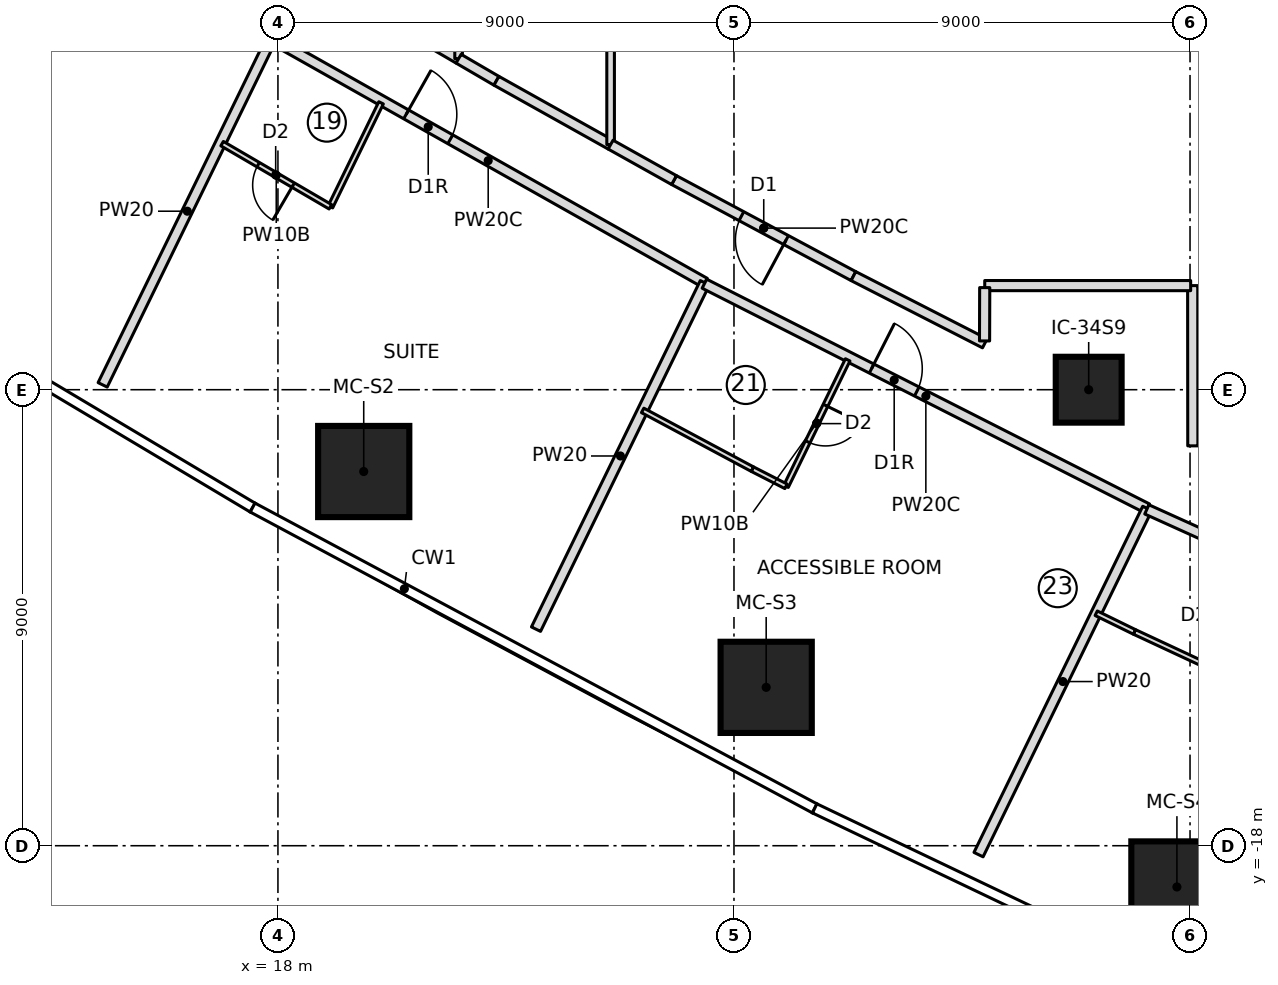
"""IFC4 building model, lengths in metres.
Left out: names, types, materials, properties, quantities, classifications, styles, units other than length and angle.
Written with IfcOpenShell. Run it as: python <this file> out.ifc"""

import sys

from ifc_helpers import new_model, si_unit, direction, frame, frame_2d, origin, origin_2d, place, context, subcontext, project, spatial, rectangle, extrude, element, fill, save


model = new_model("IFC4")
c1 = context("Model", 3, precision=1e-05, world=origin(), true_north=direction((0.0, 1.0)))
c2 = subcontext(c1, "Body", "Model", "MODEL_VIEW")
j1 = project(units=[si_unit("LENGTHUNIT", "METRE"), si_unit("PLANEANGLEUNIT", "RADIAN")], contexts=[c1])
p1 = place(None, origin())
s1 = spatial("IfcSite", under=j1, at=p1, CompositionType="ELEMENT")
p2 = place(p1, origin())
s2 = spatial("IfcBuilding", under=s1, at=p2, CompositionType="ELEMENT")
p3 = place(p2, frame((0.0, 0.0, 57.35)))
s3 = spatial("IfcBuildingStorey", under=s2, at=p3, CompositionType="ELEMENT", Elevation=57.35)
for number, where, z_axis, x_axis in (
    (1, (19.693, -10.615, 0.0), (0.0, 0.0, 1.0), (1.0, 0.0, 0.0)),
    (2, (27.635, -14.874, 0.0), (0.0, 0.0, 1.0), (1.0, 0.0, 0.0)),
    (3, (35.741, -18.814, 0.0), (0.0, 0.0, 1.0), (1.0, 0.0, 0.0)),
):
    element("IfcColumn", number, at=place(p3, frame(where, z_axis=z_axis, x_axis=x_axis)), inside=s3, PredefinedType="COLUMN", context=c2, shape_type="SweptSolid", body=[
        extrude(rectangle(XDim=1.8, YDim=1.8, at=origin_2d()), origin(), (0.0, 0.0, 1.0), 3.55),
    ])
p4 = place(p3, frame((34.0, -9.0, 0.0), z_axis=(0.0, 0.0, 1.0), x_axis=(1.0, 0.0, 0.0)))
e4 = element("IfcColumn", 4, at=p4, inside=s3, PredefinedType="COLUMN", context=c2, shape_type="SweptSolid", body=[
    extrude(rectangle(XDim=1.3, YDim=1.3, at=origin_2d()), origin(), (0.0, 0.0, 1.0), 3.55),
])
p5 = place(p3, frame((14.541, -8.904, 0.0), z_axis=(0.0, 0.0, 1.0), x_axis=(0.438213564788, 0.898870887078, 0.0)))
e5 = element("IfcWall", 5, at=p5, inside=s3, PredefinedType="PARTITIONING", context=c2, shape_type="SweptSolid", body=[
    extrude(rectangle(XDim=7.625, YDim=0.2, at=frame_2d((3.813, 0.0))), origin(), (0.0, 0.0, 1.0), 3.25),
])
p6 = place(p3, frame((17.874, -2.068, 0.0), z_axis=(0.0, 0.0, 1.0), x_axis=(0.871078318876, -0.491144136057, 0.0)))
e6 = element("IfcWall", 6, at=p6, inside=s3, PredefinedType="PARTITIONING", context=c2, shape_type="SweptSolid", body=[
    extrude(rectangle(XDim=9.817, YDim=0.2, at=frame_2d((4.909, 0.0))), origin(), (0.0, 0.0, 1.0), 3.25),
])
p7 = place(p6, frame((3.05, 0.0, 0.0)))
e7 = element("IfcOpeningElement", 7, at=p7, cuts=e6, PredefinedType="OPENING", context=c2, shape_type="SweptSolid", body=[
    extrude(rectangle(XDim=1.0, YDim=2.1, at=frame_2d((0.5, 1.05))), frame((0.0, 0.11, 0.0), z_axis=(0.0, -1.0, 0.0), x_axis=(1.0, 0.0, 0.0)), (0.0, 0.0, 1.0), 0.22),
])
p8 = place(p3, frame((20.035, -3.338, 0.0), z_axis=(0.0, 0.0, 1.0), x_axis=(-0.438122322582, -0.898915363344, 0.0)))
e8 = element("IfcWall", 8, at=p8, inside=s3, PredefinedType="PARTITIONING", context=c2, shape_type="SweptSolid", body=[
    extrude(rectangle(XDim=2.283, YDim=0.1, at=frame_2d((1.142, 0.0))), origin(), (0.0, 0.0, 1.0), 3.25),
])
p9 = place(p3, frame((19.035, -5.39, 0.0), z_axis=(0.0, 0.0, 1.0), x_axis=(-0.863707305865, 0.503993739837, 0.0)))
e9 = element("IfcWall", 9, at=p9, inside=s3, PredefinedType="PARTITIONING", context=c2, shape_type="SweptSolid", body=[
    extrude(rectangle(XDim=2.474, YDim=0.1, at=frame_2d((1.237, 0.0))), origin(), (0.0, 0.0, 1.0), 3.25),
])
p10 = place(p9, frame((0.85, 0.0, 0.0)))
e10 = element("IfcOpeningElement", 10, at=p10, cuts=e9, PredefinedType="OPENING", context=c2, shape_type="SweptSolid", body=[
    extrude(rectangle(XDim=0.8, YDim=2.1, at=frame_2d((0.4, 1.05))), frame((0.0, 0.06, 0.0), z_axis=(0.0, -1.0, 0.0), x_axis=(1.0, 0.0, 0.0)), (0.0, 0.0, 1.0), 0.12),
])
p11 = place(p3, frame((23.093, -13.726, 0.0), z_axis=(0.0, 0.0, 1.0), x_axis=(0.438202895602, 0.898876088394, 0.0)))
e11 = element("IfcWall", 11, at=p11, inside=s3, PredefinedType="PARTITIONING", context=c2, shape_type="SweptSolid", body=[
    extrude(rectangle(XDim=7.605, YDim=0.2, at=frame_2d((3.803, 0.0))), origin(), (0.0, 0.0, 1.0), 3.25),
])
p12 = place(p3, frame((26.417, -6.908, 0.0), z_axis=(0.0, 0.0, 1.0), x_axis=(0.891700643128, -0.452625632334, 0.0)))
e12 = element("IfcWall", 12, at=p12, inside=s3, PredefinedType="PARTITIONING", context=c2, shape_type="SweptSolid", body=[
    extrude(rectangle(XDim=9.801, YDim=0.2, at=frame_2d((4.901, 0.0))), origin(), (0.0, 0.0, 1.0), 3.25),
])
p13 = place(p12, frame((3.7, 0.0, 0.0)))
e13 = element("IfcOpeningElement", 13, at=p13, cuts=e12, PredefinedType="OPENING", context=c2, shape_type="SweptSolid", body=[
    extrude(rectangle(XDim=1.0, YDim=2.1, at=frame_2d((0.5, 1.05))), frame((0.0, 0.11, 0.0), z_axis=(0.0, -1.0, 0.0), x_axis=(1.0, 0.0, 0.0)), (0.0, 0.0, 1.0), 0.22),
])
p14 = place(p3, frame((29.244, -8.411, 0.0), z_axis=(0.0, 0.0, 1.0), x_axis=(-0.438189818179, -0.898882463531, 0.0)))
e14 = element("IfcWall", 14, at=p14, inside=s3, PredefinedType="PARTITIONING", context=c2, shape_type="SweptSolid", body=[
    extrude(rectangle(XDim=2.777, YDim=0.1, at=frame_2d((1.389, 0.0))), origin(), (0.0, 0.0, 1.0), 3.25),
])
p15 = place(p14, frame((1.0, 0.0, 0.0)))
e15 = element("IfcOpeningElement", 15, at=p15, cuts=e14, PredefinedType="OPENING", context=c2, shape_type="SweptSolid", body=[
    extrude(rectangle(XDim=0.8, YDim=2.1, at=frame_2d((0.4, 1.05))), frame((0.0, 0.06, 0.0), z_axis=(0.0, -1.0, 0.0), x_axis=(1.0, 0.0, 0.0)), (0.0, 0.0, 1.0), 0.12),
])
p16 = place(p3, frame((28.027, -10.907, 0.0), z_axis=(0.0, 0.0, 1.0), x_axis=(-0.890195653003, 0.455578422858, 0.0)))
e16 = element("IfcWall", 16, at=p16, inside=s3, PredefinedType="PARTITIONING", context=c2, shape_type="SweptSolid", body=[
    extrude(rectangle(XDim=0.745, YDim=0.1, at=frame_2d((0.373, 0.0))), origin(), (0.0, 0.0, 1.0), 3.25),
])
p17 = place(p3, frame((27.363, -10.568, 0.0), z_axis=(0.0, 0.0, 1.0), x_axis=(-0.881658684569, 0.471887660279, 0.0)))
e17 = element("IfcWall", 17, at=p17, inside=s3, PredefinedType="PARTITIONING", context=c2, shape_type="SweptSolid", body=[
    extrude(rectangle(XDim=2.457, YDim=0.1, at=frame_2d((1.228, 0.0))), origin(), (0.0, 0.0, 1.0), 3.25),
])
p18 = place(p3, frame((31.826, -18.176, 0.0), z_axis=(0.0, 0.0, 1.0), x_axis=(0.438196407286, 0.898879251425, 0.0)))
e18 = element("IfcWall", 18, at=p18, inside=s3, PredefinedType="PARTITIONING", context=c2, shape_type="SweptSolid", body=[
    extrude(rectangle(XDim=7.6, YDim=0.2, at=frame_2d((3.8, 0.0))), origin(), (0.0, 0.0, 1.0), 3.25),
])
p19 = place(p3, frame((35.148, -11.362, 0.0), z_axis=(0.0, 0.0, 1.0), x_axis=(0.9111333041, -0.412111759308, 0.0)))
e19 = element("IfcWall", 19, at=p19, inside=s3, PredefinedType="PARTITIONING", context=c2, shape_type="SweptSolid", body=[
    extrude(rectangle(XDim=9.804, YDim=0.2, at=frame_2d((4.902, 0.0))), origin(), (0.0, 0.0, 1.0), 3.25),
])
p20 = place(p19, frame((3.05, 0.0, 0.0)))
e20 = element("IfcOpeningElement", 20, at=p20, cuts=e19, PredefinedType="OPENING", context=c2, shape_type="SweptSolid", body=[
    extrude(rectangle(XDim=1.5, YDim=2.1, at=frame_2d((0.75, 1.05))), frame((0.0, 0.11, 0.0), z_axis=(0.0, -1.0, 0.0), x_axis=(1.0, 0.0, 0.0)), (0.0, 0.0, 1.0), 0.22),
])
p21 = place(p3, frame((36.408, -14.482, 0.0), z_axis=(0.0, 0.0, 1.0), x_axis=(-0.906434605418, 0.422346192242, 0.0)))
e21 = element("IfcWall", 21, at=p21, inside=s3, PredefinedType="PARTITIONING", context=c2, shape_type="SweptSolid", body=[
    extrude(rectangle(XDim=1.661, YDim=0.1, at=frame_2d((0.83, 0.0))), origin(), (0.0, 0.0, 1.0), 3.25),
])
p22 = place(p3, frame((34.903, -13.781, 0.0), z_axis=(0.0, 0.0, 1.0), x_axis=(-0.89828999443, 0.43940310184, 0.0)))
e22 = element("IfcWall", 22, at=p22, inside=s3, PredefinedType="PARTITIONING", context=c2, shape_type="SweptSolid", body=[
    extrude(rectangle(XDim=0.84, YDim=0.1, at=frame_2d((0.42, 0.0))), origin(), (0.0, 0.0, 1.0), 3.25),
])
p23 = place(p3, frame((21.565, -2.467, 0.0), z_axis=(0.0, 0.0, 1.0), x_axis=(-0.86371145221, 0.503986634071, 0.0)))
e23 = element("IfcWall", 23, at=p23, inside=s3, PredefinedType="PARTITIONING", context=c2, shape_type="SweptSolid", body=[
    extrude(rectangle(XDim=3.151, YDim=0.2, at=frame_2d((1.576, 0.0))), origin(), (0.0, 0.0, 1.0), 3.25),
])
p24 = place(p3, frame((21.565, -2.467, 0.0), z_axis=(0.0, 0.0, 1.0), x_axis=(0.0, 1.0, 0.0)))
e24 = element("IfcWall", 24, at=p24, inside=s3, PredefinedType="PARTITIONING", context=c2, shape_type="SweptSolid", body=[
    extrude(rectangle(XDim=4.935, YDim=0.15, at=frame_2d((2.467, 0.0))), origin(), (0.0, 0.0, 1.0), 3.25),
])
p25 = place(p3, frame((22.312, -2.903, 0.0), z_axis=(0.0, 0.0, 1.0), x_axis=(-0.863707207562, 0.503993908303, 0.0)))
e25 = element("IfcWall", 25, at=p25, inside=s3, PredefinedType="PARTITIONING", context=c2, shape_type="SweptSolid", body=[
    extrude(rectangle(XDim=0.865, YDim=0.2, at=frame_2d((0.432, 0.0))), origin(), (0.0, 0.0, 1.0), 3.25),
])
p26 = place(p3, frame((24.565, -4.163, 0.0), z_axis=(0.0, 0.0, 1.0), x_axis=(-0.872797752414, 0.488082045748, 0.0)))
e26 = element("IfcWall", 26, at=p26, inside=s3, PredefinedType="PARTITIONING", context=c2, shape_type="SweptSolid", body=[
    extrude(rectangle(XDim=2.582, YDim=0.2, at=frame_2d((1.291, 0.0))), origin(), (0.0, 0.0, 1.0), 3.25),
])
p27 = place(p3, frame((24.565, -4.163, 0.0), z_axis=(0.0, 0.0, 1.0), x_axis=(0.0, 1.0, 0.0)))
e27 = element("IfcWall", 27, at=p27, inside=s3, PredefinedType="PARTITIONING", context=c2, shape_type="SweptSolid", body=[
    extrude(rectangle(XDim=8.326, YDim=0.15, at=frame_2d((4.163, 0.0))), origin(), (0.0, 0.0, 1.0), 3.25),
])
p28 = place(p3, frame((29.357, -6.758, 0.0), z_axis=(0.0, 0.0, 1.0), x_axis=(-0.881655245922, 0.471894084874, 0.0)))
e28 = element("IfcWall", 28, at=p28, inside=s3, PredefinedType="PARTITIONING", context=c2, shape_type="SweptSolid", body=[
    extrude(rectangle(XDim=4.016, YDim=0.2, at=frame_2d((2.008, 0.0))), origin(), (0.0, 0.0, 1.0), 3.25),
])
p29 = place(p28, frame((1.508, 0.0, 0.0)))
e29 = element("IfcOpeningElement", 29, at=p29, cuts=e28, PredefinedType="OPENING", context=c2, shape_type="SweptSolid", body=[
    extrude(rectangle(XDim=1.0, YDim=2.1, at=frame_2d((0.5, 1.05))), frame((0.0, 0.11, 0.0), z_axis=(0.0, -1.0, 0.0), x_axis=(1.0, 0.0, 0.0)), (0.0, 0.0, 1.0), 0.22),
])
p30 = place(p3, frame((31.95, -8.085, 0.0), z_axis=(0.0, 0.0, 1.0), x_axis=(-0.890213377055, 0.455543788579, 0.0)))
e30 = element("IfcWall", 30, at=p30, inside=s3, PredefinedType="PARTITIONING", context=c2, shape_type="SweptSolid", body=[
    extrude(rectangle(XDim=2.912, YDim=0.2, at=frame_2d((1.456, 0.0))), origin(), (0.0, 0.0, 1.0), 3.25),
])
p31 = place(p3, frame((25.817, -4.863, 0.0), z_axis=(0.0, 0.0, 1.0), x_axis=(-0.872804855849, 0.488069343031, 0.0)))
e31 = element("IfcWall", 31, at=p31, inside=s3, PredefinedType="PARTITIONING", context=c2, shape_type="SweptSolid", body=[
    extrude(rectangle(XDim=1.434, YDim=0.2, at=frame_2d((0.717, 0.0))), origin(), (0.0, 0.0, 1.0), 3.25),
])
p32 = place(p3, frame((36.055, -10.108, 0.0), z_axis=(0.0, 0.0, 1.0), x_axis=(-0.00077190251, 0.999999702083, 0.0)))
e32 = element("IfcWall", 32, at=p32, inside=s3, PredefinedType="PARTITIONING", context=c2, shape_type="SweptSolid", body=[
    extrude(rectangle(XDim=3.163, YDim=0.2, at=frame_2d((1.582, 0.0))), origin(), (0.0, 0.0, 1.0), 3.25),
])
p33 = place(p3, frame((36.012, -6.946, 0.0), z_axis=(0.0, 0.0, 1.0), x_axis=(-0.999999998196, 6.0074492e-05, 0.0)))
e33 = element("IfcWall", 33, at=p33, inside=s3, PredefinedType="PARTITIONING", context=c2, shape_type="SweptSolid", body=[
    extrude(rectangle(XDim=4.064, YDim=0.2, at=frame_2d((2.032, 0.0))), origin(), (0.0, 0.0, 1.0), 3.25),
])
p34 = place(p3, frame((31.948, -6.985, 0.0), z_axis=(0.0, 0.0, 1.0), x_axis=(-0.003248242724, -0.999994724446, 0.0)))
e34 = element("IfcWall", 34, at=p34, inside=s3, PredefinedType="PARTITIONING", context=c2, shape_type="SweptSolid", body=[
    extrude(rectangle(XDim=1.052, YDim=0.2, at=frame_2d((0.526, 0.0))), origin(), (0.0, 0.0, 1.0), 3.25),
])
p35 = place(p10, origin())
e35 = element("IfcDoor", 35, at=p35, inside=s3, OperationType="SINGLE_SWING_LEFT", PredefinedType="DOOR", context=c2, shape_type="SweptSolid", body=[
    extrude(rectangle(XDim=0.8, YDim=2.1, at=frame_2d((0.4, 1.05))), frame((0.0, 0.025, 0.0), z_axis=(0.0, -1.0, 0.0), x_axis=(1.0, 0.0, 0.0)), (0.0, 0.0, 1.0), 0.05),
])
fill(e10, e35)
p36 = place(p7, origin())
e36 = element("IfcDoor", 36, at=p36, inside=s3, OperationType="SINGLE_SWING_RIGHT", PredefinedType="DOOR", context=c2, shape_type="SweptSolid", body=[
    extrude(rectangle(XDim=1.0, YDim=2.1, at=frame_2d((0.5, 1.05))), frame((0.0, 0.025, 0.0), z_axis=(0.0, -1.0, 0.0), x_axis=(1.0, 0.0, 0.0)), (0.0, 0.0, 1.0), 0.05),
])
fill(e7, e36)
p37 = place(p15, origin())
e37 = element("IfcDoor", 37, at=p37, inside=s3, OperationType="SINGLE_SWING_LEFT", PredefinedType="DOOR", context=c2, shape_type="SweptSolid", body=[
    extrude(rectangle(XDim=0.8, YDim=2.1, at=frame_2d((0.4, 1.05))), frame((0.0, 0.025, 0.0), z_axis=(0.0, -1.0, 0.0), x_axis=(1.0, 0.0, 0.0)), (0.0, 0.0, 1.0), 0.05),
])
fill(e15, e37)
p38 = place(p13, origin())
e38 = element("IfcDoor", 38, at=p38, inside=s3, OperationType="SINGLE_SWING_RIGHT", PredefinedType="DOOR", context=c2, shape_type="SweptSolid", body=[
    extrude(rectangle(XDim=1.0, YDim=2.1, at=frame_2d((0.5, 1.05))), frame((0.0, 0.025, 0.0), z_axis=(0.0, -1.0, 0.0), x_axis=(1.0, 0.0, 0.0)), (0.0, 0.0, 1.0), 0.05),
])
fill(e13, e38)
p39 = place(p29, origin())
e39 = element("IfcDoor", 39, at=p39, inside=s3, OperationType="SINGLE_SWING_LEFT", PredefinedType="DOOR", context=c2, shape_type="SweptSolid", body=[
    extrude(rectangle(XDim=1.0, YDim=2.1, at=frame_2d((0.5, 1.05))), frame((0.0, 0.025, 0.0), z_axis=(0.0, -1.0, 0.0), x_axis=(1.0, 0.0, 0.0)), (0.0, 0.0, 1.0), 0.05),
])
fill(e29, e39)
save(model, sys.argv[1])
